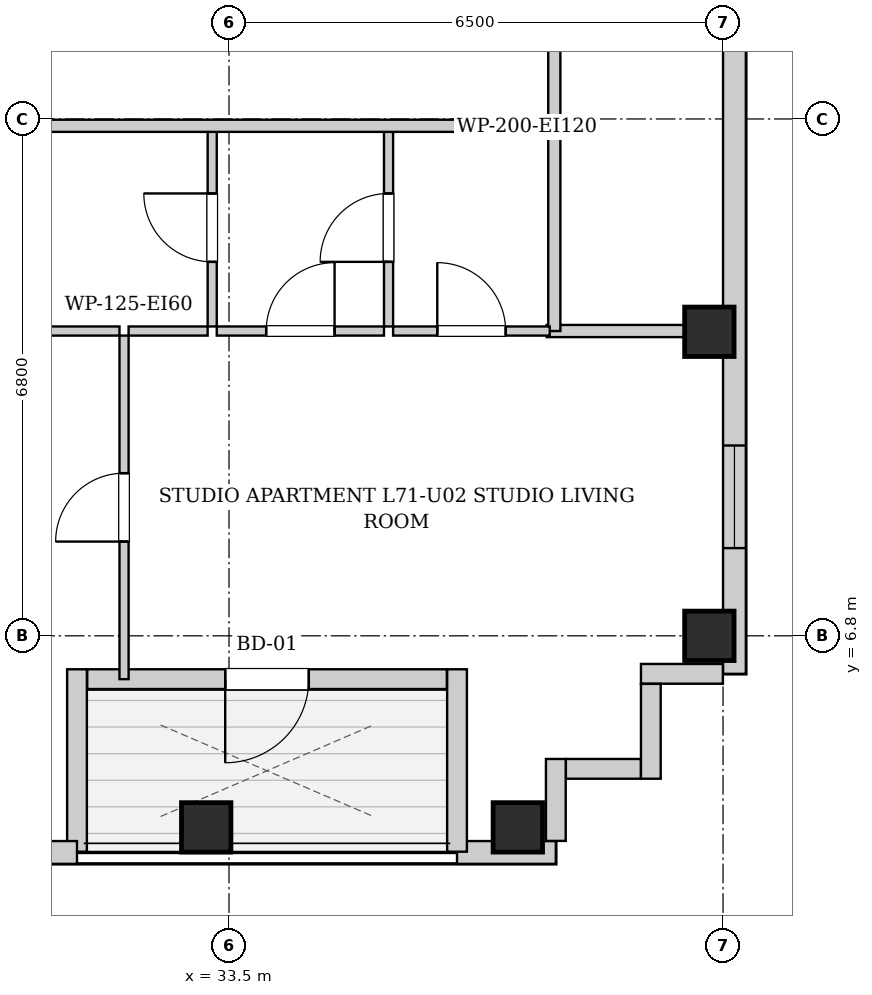
"""IFC4 building model, lengths in metres.
Left out: names, types, materials, properties, quantities, classifications, styles, units other than length and angle.
Written with IfcOpenShell. Run it as: python <this file> out.ifc"""

import sys

from ifc_helpers import new_model, si_unit, direction, frame, frame_2d, origin, origin_2d, place, context, subcontext, project, spatial, rectangle, extrude, element, fill, save


model = new_model("IFC4")
c1 = context("Model", 3, precision=1e-05, world=origin(), true_north=direction((0.0, 1.0)))
c2 = subcontext(c1, "Body", "Model", "MODEL_VIEW")
j1 = project(units=[si_unit("LENGTHUNIT", "METRE"), si_unit("PLANEANGLEUNIT", "RADIAN")], contexts=[c1])
p1 = place(None, origin())
s1 = spatial("IfcSite", under=j1, at=p1, CompositionType="ELEMENT")
p2 = place(p1, origin())
s2 = spatial("IfcBuilding", under=s1, at=p2, CompositionType="ELEMENT")
p3 = place(p2, frame((0.0, 0.0, 244.5)))
s3 = spatial("IfcBuildingStorey", under=s2, at=p3, CompositionType="ELEMENT", Elevation=244.5)
for number, where, z_axis, x_axis in (
    (1, (33.2, 4.28, 0.0), (0.0, 0.0, 1.0), (1.0, 0.0, 0.0)),
    (2, (37.3, 4.28, 0.0), (0.0, 0.0, 1.0), (1.0, 0.0, 0.0)),
    (3, (39.82, 6.8, 0.0), (0.0, 0.0, 1.0), (1.0, 0.0, 0.0)),
    (4, (39.82, 10.8, 0.0), (0.0, 0.0, 1.0), (1.0, 0.0, 0.0)),
):
    element("IfcColumn", number, at=place(p3, frame(where, z_axis=z_axis, x_axis=x_axis)), inside=s3, PredefinedType="COLUMN", context=c2, shape_type="SweptSolid", body=[
        extrude(rectangle(XDim=0.65, YDim=0.65, at=origin_2d()), origin(), (0.0, 0.0, 1.0), 3.4),
    ])
p4 = place(p3, frame((40.15, 37.7, 0.0), z_axis=(0.0, 0.0, 1.0), x_axis=(0.0, -1.0, 0.0)))
e5 = element("IfcWall", 5, at=p4, inside=s3, PredefinedType="SOLIDWALL", context=c2, shape_type="SweptSolid", body=[
    extrude(rectangle(XDim=31.4, YDim=0.3, at=frame_2d((15.7, 0.0))), origin(), (0.0, 0.0, 1.0), 3.14),
])
p5 = place(p4, frame((28.396, 0.0, 0.55)))
e6 = element("IfcOpeningElement", 6, at=p5, cuts=e5, PredefinedType="OPENING", context=c2, shape_type="SweptSolid", body=[
    extrude(rectangle(XDim=1.35, YDim=1.2, at=frame_2d((0.675, 0.6))), frame((0.0, 0.16, 0.0), z_axis=(0.0, -1.0, 0.0), x_axis=(1.0, 0.0, 0.0)), (0.0, 0.0, 1.0), 0.32),
])
p6 = place(p4, frame((1.653, 0.0, 0.55)))
e7 = element("IfcOpeningElement", 7, at=p6, cuts=e5, PredefinedType="OPENING", context=c2, shape_type="SweptSolid", body=[
    extrude(rectangle(XDim=1.35, YDim=1.2, at=frame_2d((0.675, 0.6))), frame((0.0, 0.16, 0.0), z_axis=(0.0, -1.0, 0.0), x_axis=(1.0, 0.0, 0.0)), (0.0, 0.0, 1.0), 0.32),
])
p7 = place(p4, frame((19.683, 0.0, 0.55)))
e8 = element("IfcOpeningElement", 8, at=p7, cuts=e5, PredefinedType="OPENING", context=c2, shape_type="SweptSolid", body=[
    extrude(rectangle(XDim=1.35, YDim=1.2, at=frame_2d((0.675, 0.6))), frame((0.0, 0.16, 0.0), z_axis=(0.0, -1.0, 0.0), x_axis=(1.0, 0.0, 0.0)), (0.0, 0.0, 1.0), 0.32),
])
p8 = place(p4, frame((10.367, 0.0, 0.55)))
e9 = element("IfcOpeningElement", 9, at=p8, cuts=e5, PredefinedType="OPENING", context=c2, shape_type="SweptSolid", body=[
    extrude(rectangle(XDim=1.35, YDim=1.2, at=frame_2d((0.675, 0.6))), frame((0.0, 0.16, 0.0), z_axis=(0.0, -1.0, 0.0), x_axis=(1.0, 0.0, 0.0)), (0.0, 0.0, 1.0), 0.32),
])
p9 = place(p3, frame((37.8, 3.95, 0.0), z_axis=(0.0, 0.0, 1.0), x_axis=(-1.0, 0.0, 0.0)))
e10 = element("IfcWall", 10, at=p9, inside=s3, PredefinedType="SOLIDWALL", context=c2, shape_type="SweptSolid", body=[
    extrude(rectangle(XDim=1.3, YDim=0.3, at=frame_2d((0.65, 0.0))), origin(), (0.0, 0.0, 1.0), 3.14),
])
p10 = place(p3, frame((36.5, 3.96, 0.0), z_axis=(0.0, 0.0, 1.0), x_axis=(0.0, 1.0, 0.0)))
e11 = element("IfcWall", 11, at=p10, inside=s3, PredefinedType="SOLIDWALL", context=c2, shape_type="SweptSolid", body=[
    extrude(rectangle(XDim=2.4, YDim=0.26, at=frame_2d((1.2, 0.0))), origin(), (0.0, 0.0, 1.0), 3.14),
])
p11 = place(p3, frame((36.366, 6.23, 0.0), z_axis=(0.0, 0.0, 1.0), x_axis=(-1.0, 0.0, 0.0)))
e12 = element("IfcWall", 12, at=p11, inside=s3, PredefinedType="SOLIDWALL", context=c2, shape_type="SweptSolid", body=[
    extrude(rectangle(XDim=4.732, YDim=0.26, at=frame_2d((2.366, 0.0))), origin(), (0.0, 0.0, 1.0), 3.14),
])
p12 = place(p11, frame((1.816, 0.0, 0.0)))
e13 = element("IfcOpeningElement", 13, at=p12, cuts=e12, PredefinedType="OPENING", context=c2, shape_type="SweptSolid", body=[
    extrude(rectangle(XDim=1.1, YDim=2.0, at=frame_2d((0.55, 1.0))), frame((0.0, 0.14, 0.0), z_axis=(0.0, -1.0, 0.0), x_axis=(1.0, 0.0, 0.0)), (0.0, 0.0, 1.0), 0.28),
])
p13 = place(p3, frame((31.5, 6.36, 0.0), z_axis=(0.0, 0.0, 1.0), x_axis=(0.0, -1.0, 0.0)))
e14 = element("IfcWall", 14, at=p13, inside=s3, PredefinedType="SOLIDWALL", context=c2, shape_type="SweptSolid", body=[
    extrude(rectangle(XDim=2.4, YDim=0.26, at=frame_2d((1.2, 0.0))), origin(), (0.0, 0.0, 1.0), 3.14),
])
p14 = place(p3, frame((31.5, 3.95, 0.0), z_axis=(0.0, 0.0, 1.0), x_axis=(-1.0, 0.0, 0.0)))
e15 = element("IfcWall", 15, at=p14, inside=s3, PredefinedType="SOLIDWALL", context=c2, shape_type="SweptSolid", body=[
    extrude(rectangle(XDim=10.1, YDim=0.3, at=frame_2d((5.05, 0.0))), origin(), (0.0, 0.0, 1.0), 3.14),
])
p15 = place(p14, frame((3.15, 0.0, 0.55)))
e16 = element("IfcOpeningElement", 16, at=p15, cuts=e15, PredefinedType="OPENING", context=c2, shape_type="SweptSolid", body=[
    extrude(rectangle(XDim=0.85, YDim=1.2, at=frame_2d((0.425, 0.6))), frame((0.0, 0.16, 0.0), z_axis=(0.0, -1.0, 0.0), x_axis=(1.0, 0.0, 0.0)), (0.0, 0.0, 1.0), 0.32),
])
p16 = place(p14, frame((0.757, 0.0, 0.55)))
e17 = element("IfcOpeningElement", 17, at=p16, cuts=e15, PredefinedType="OPENING", context=c2, shape_type="SweptSolid", body=[
    extrude(rectangle(XDim=1.35, YDim=1.2, at=frame_2d((0.675, 0.6))), frame((0.0, 0.16, 0.0), z_axis=(0.0, -1.0, 0.0), x_axis=(1.0, 0.0, 0.0)), (0.0, 0.0, 1.0), 0.32),
])
p17 = place(p3, frame((39.998, 6.3, 0.0), z_axis=(0.0, 0.0, 1.0), x_axis=(-1.0, 0.0, 0.0)))
e18 = element("IfcWall", 18, at=p17, inside=s3, PredefinedType="SOLIDWALL", context=c2, shape_type="SweptSolid", body=[
    extrude(rectangle(XDim=1.078, YDim=0.26, at=frame_2d((0.539, 0.0))), origin(), (0.0, 0.0, 1.0), 3.14),
])
p18 = place(p3, frame((39.05, 6.168, 0.0), z_axis=(0.0, 0.0, 1.0), x_axis=(0.0, -1.0, 0.0)))
e19 = element("IfcWall", 19, at=p18, inside=s3, PredefinedType="SOLIDWALL", context=c2, shape_type="SweptSolid", body=[
    extrude(rectangle(XDim=1.248, YDim=0.26, at=frame_2d((0.624, 0.0))), origin(), (0.0, 0.0, 1.0), 3.14),
])
p19 = place(p3, frame((38.918, 5.05, 0.0), z_axis=(0.0, 0.0, 1.0), x_axis=(-1.0, 0.0, 0.0)))
e20 = element("IfcWall", 20, at=p19, inside=s3, PredefinedType="SOLIDWALL", context=c2, shape_type="SweptSolid", body=[
    extrude(rectangle(XDim=0.986, YDim=0.26, at=frame_2d((0.493, 0.0))), origin(), (0.0, 0.0, 1.0), 3.14),
])
p20 = place(p3, frame((37.8, 5.18, 0.0), z_axis=(0.0, 0.0, 1.0), x_axis=(0.0, -1.0, 0.0)))
e21 = element("IfcWall", 21, at=p20, inside=s3, PredefinedType="SOLIDWALL", context=c2, shape_type="SweptSolid", body=[
    extrude(rectangle(XDim=1.078, YDim=0.26, at=frame_2d((0.539, 0.0))), origin(), (0.0, 0.0, 1.0), 3.14),
])
p21 = place(p3, frame((37.78, 13.51, 0.0), z_axis=(0.0, 0.0, 1.0), x_axis=(0.0, 1.0, 0.0)))
e22 = element("IfcWall", 22, at=p21, inside=s3, PredefinedType="PARTITIONING", context=c2, shape_type="SweptSolid", body=[
    extrude(rectangle(XDim=1.58, YDim=0.16, at=frame_2d((0.79, 0.0))), origin(), (0.0, 0.0, 1.0), 3.14),
])
p22 = place(p3, frame((37.68, 10.81, 0.0), z_axis=(0.0, 0.0, 1.0), x_axis=(1.0, 0.0, 0.0)))
e23 = element("IfcWall", 23, at=p22, inside=s3, PredefinedType="PARTITIONING", context=c2, shape_type="SweptSolid", body=[
    extrude(rectangle(XDim=2.34, YDim=0.16, at=frame_2d((1.17, 0.0))), origin(), (0.0, 0.0, 1.0), 3.14),
])
p23 = place(p3, frame((37.78, 10.81, 0.0), z_axis=(0.0, 0.0, 1.0), x_axis=(0.0, 1.0, 0.0)))
e24 = element("IfcWall", 24, at=p23, inside=s3, PredefinedType="PARTITIONING", context=c2, shape_type="SweptSolid", body=[
    extrude(rectangle(XDim=2.66, YDim=0.16, at=frame_2d((1.33, 0.0))), origin(), (0.0, 0.0, 1.0), 3.14),
])
p24 = place(p3, frame((33.279, 10.87, 0.0), z_axis=(0.0, 0.0, 1.0), x_axis=(0.0, 1.0, 0.0)))
e25 = element("IfcWall", 25, at=p24, inside=s3, PredefinedType="PARTITIONING", context=c2, shape_type="SweptSolid", body=[
    extrude(rectangle(XDim=2.6, YDim=0.12, at=frame_2d((1.3, 0.0))), origin(), (0.0, 0.0, 1.0), 2.668),
])
p25 = place(p24, frame((0.85, 0.0, 0.0)))
e26 = element("IfcOpeningElement", 26, at=p25, cuts=e25, PredefinedType="OPENING", context=c2, shape_type="SweptSolid", body=[
    extrude(rectangle(XDim=0.9, YDim=2.05, at=frame_2d((0.45, 1.025))), frame((0.0, 0.07, 0.0), z_axis=(0.0, -1.0, 0.0), x_axis=(1.0, 0.0, 0.0)), (0.0, 0.0, 1.0), 0.14),
])
for number, where, z_axis, x_axis in (
    (27, (31.019, 10.81, 0.0), (0.0, 0.0, 1.0), (1.0, 0.0, 0.0)),
    (28, (32.179, 10.81, 0.0), (0.0, 0.0, 1.0), (1.0, 0.0, 0.0)),
):
    element("IfcWall", number, at=place(p3, frame(where, z_axis=z_axis, x_axis=x_axis)), inside=s3, PredefinedType="PARTITIONING", context=c2, shape_type="SweptSolid", body=[
        extrude(rectangle(XDim=1.04, YDim=0.12, at=frame_2d((0.52, 0.0))), origin(), (0.0, 0.0, 1.0), 3.14),
    ])
p26 = place(p3, frame((35.599, 10.87, 0.0), z_axis=(0.0, 0.0, 1.0), x_axis=(0.0, 1.0, 0.0)))
e29 = element("IfcWall", 29, at=p26, inside=s3, PredefinedType="PARTITIONING", context=c2, shape_type="SweptSolid", body=[
    extrude(rectangle(XDim=2.6, YDim=0.12, at=frame_2d((1.3, 0.0))), origin(), (0.0, 0.0, 1.0), 3.14),
])
p27 = place(p26, frame((0.85, 0.0, 0.0)))
e30 = element("IfcOpeningElement", 30, at=p27, cuts=e29, PredefinedType="OPENING", context=c2, shape_type="SweptSolid", body=[
    extrude(rectangle(XDim=0.9, YDim=2.05, at=frame_2d((0.45, 1.025))), frame((0.0, 0.07, 0.0), z_axis=(0.0, -1.0, 0.0), x_axis=(1.0, 0.0, 0.0)), (0.0, 0.0, 1.0), 0.14),
])
p28 = place(p3, frame((33.339, 10.81, 0.0), z_axis=(0.0, 0.0, 1.0), x_axis=(1.0, 0.0, 0.0)))
e31 = element("IfcWall", 31, at=p28, inside=s3, PredefinedType="PARTITIONING", context=c2, shape_type="SweptSolid", body=[
    extrude(rectangle(XDim=2.2, YDim=0.12, at=frame_2d((1.1, 0.0))), origin(), (0.0, 0.0, 1.0), 3.14),
])
p29 = place(p28, frame((0.65, 0.0, 0.0)))
e32 = element("IfcOpeningElement", 32, at=p29, cuts=e31, PredefinedType="OPENING", context=c2, shape_type="SweptSolid", body=[
    extrude(rectangle(XDim=0.9, YDim=2.05, at=frame_2d((0.45, 1.025))), frame((0.0, 0.07, 0.0), z_axis=(0.0, -1.0, 0.0), x_axis=(1.0, 0.0, 0.0)), (0.0, 0.0, 1.0), 0.14),
])
p30 = place(p3, frame((35.659, 10.81, 0.0), z_axis=(0.0, 0.0, 1.0), x_axis=(1.0, 0.0, 0.0)))
e33 = element("IfcWall", 33, at=p30, inside=s3, PredefinedType="PARTITIONING", context=c2, shape_type="SweptSolid", body=[
    extrude(rectangle(XDim=2.061, YDim=0.12, at=frame_2d((1.031, 0.0))), origin(), (0.0, 0.0, 1.0), 3.14),
])
p31 = place(p30, frame((0.581, 0.0, 0.0)))
e34 = element("IfcOpeningElement", 34, at=p31, cuts=e33, PredefinedType="OPENING", context=c2, shape_type="SweptSolid", body=[
    extrude(rectangle(XDim=0.9, YDim=2.05, at=frame_2d((0.45, 1.025))), frame((0.0, 0.07, 0.0), z_axis=(0.0, -1.0, 0.0), x_axis=(1.0, 0.0, 0.0)), (0.0, 0.0, 1.0), 0.14),
])
p32 = place(p3, frame((32.119, 6.23, 0.0), z_axis=(0.0, 0.0, 1.0), x_axis=(0.0, 1.0, 0.0)))
e35 = element("IfcWall", 35, at=p32, inside=s3, PredefinedType="PARTITIONING", context=c2, shape_type="SweptSolid", body=[
    extrude(rectangle(XDim=4.52, YDim=0.12, at=frame_2d((2.26, 0.0))), origin(), (0.0, 0.0, 1.0), 3.14),
])
p33 = place(p32, frame((1.81, 0.0, 0.0)))
e36 = element("IfcOpeningElement", 36, at=p33, cuts=e35, PredefinedType="OPENING", context=c2, shape_type="SweptSolid", body=[
    extrude(rectangle(XDim=0.9, YDim=2.05, at=frame_2d((0.45, 1.025))), frame((0.0, 0.07, 0.0), z_axis=(0.0, -1.0, 0.0), x_axis=(1.0, 0.0, 0.0)), (0.0, 0.0, 1.0), 0.14),
])
p34 = place(p3, frame((13.15, 13.51, 0.0), z_axis=(0.0, 0.0, 1.0), x_axis=(1.0, 0.0, 0.0)))
e37 = element("IfcWall", 37, at=p34, inside=s3, PredefinedType="PARTITIONING", context=c2, shape_type="SweptSolid", body=[
    extrude(rectangle(XDim=24.6, YDim=0.16, at=frame_2d((12.3, 0.0))), origin(), (0.0, 0.0, 1.0), 3.14),
])
p35 = place(p34, frame((3.165, 0.0, 0.0)))
e38 = element("IfcOpeningElement", 38, at=p35, cuts=e37, PredefinedType="OPENING", context=c2, shape_type="SweptSolid", body=[
    extrude(rectangle(XDim=0.95, YDim=2.1, at=frame_2d((0.475, 1.05))), frame((0.0, 0.09, 0.0), z_axis=(0.0, -1.0, 0.0), x_axis=(1.0, 0.0, 0.0)), (0.0, 0.0, 1.0), 0.18),
])
p36 = place(p34, frame((10.414, 0.0, 0.0)))
e39 = element("IfcOpeningElement", 39, at=p36, cuts=e37, PredefinedType="OPENING", context=c2, shape_type="SweptSolid", body=[
    extrude(rectangle(XDim=0.95, YDim=2.1, at=frame_2d((0.475, 1.05))), frame((0.0, 0.09, 0.0), z_axis=(0.0, -1.0, 0.0), x_axis=(1.0, 0.0, 0.0)), (0.0, 0.0, 1.0), 0.18),
])
p37 = place(p25, origin())
e40 = element("IfcDoor", 40, at=p37, inside=s3, OperationType="SINGLE_SWING_RIGHT", PredefinedType="DOOR", context=c2, shape_type="SweptSolid", body=[
    extrude(rectangle(XDim=0.9, YDim=2.05, at=frame_2d((0.45, 1.025))), frame((0.0, 0.025, 0.0), z_axis=(0.0, -1.0, 0.0), x_axis=(1.0, 0.0, 0.0)), (0.0, 0.0, 1.0), 0.05),
])
fill(e26, e40)
p38 = place(p27, origin())
e41 = element("IfcDoor", 41, at=p38, inside=s3, OperationType="SINGLE_SWING_LEFT", PredefinedType="DOOR", context=c2, shape_type="SweptSolid", body=[
    extrude(rectangle(XDim=0.9, YDim=2.05, at=frame_2d((0.45, 1.025))), frame((0.0, 0.025, 0.0), z_axis=(0.0, -1.0, 0.0), x_axis=(1.0, 0.0, 0.0)), (0.0, 0.0, 1.0), 0.05),
])
fill(e30, e41)
p39 = place(p29, origin())
e42 = element("IfcDoor", 42, at=p39, inside=s3, OperationType="SINGLE_SWING_RIGHT", PredefinedType="DOOR", context=c2, shape_type="SweptSolid", body=[
    extrude(rectangle(XDim=0.9, YDim=2.05, at=frame_2d((0.45, 1.025))), frame((0.0, 0.025, 0.0), z_axis=(0.0, -1.0, 0.0), x_axis=(1.0, 0.0, 0.0)), (0.0, 0.0, 1.0), 0.05),
])
fill(e32, e42)
p40 = place(p31, origin())
e43 = element("IfcDoor", 43, at=p40, inside=s3, OperationType="SINGLE_SWING_LEFT", PredefinedType="DOOR", context=c2, shape_type="SweptSolid", body=[
    extrude(rectangle(XDim=0.9, YDim=2.05, at=frame_2d((0.45, 1.025))), frame((0.0, 0.025, 0.0), z_axis=(0.0, -1.0, 0.0), x_axis=(1.0, 0.0, 0.0)), (0.0, 0.0, 1.0), 0.05),
])
fill(e34, e43)
p41 = place(p33, origin())
e44 = element("IfcDoor", 44, at=p41, inside=s3, OperationType="SINGLE_SWING_LEFT", PredefinedType="DOOR", context=c2, shape_type="SweptSolid", body=[
    extrude(rectangle(XDim=0.9, YDim=2.05, at=frame_2d((0.45, 1.025))), frame((0.0, 0.025, 0.0), z_axis=(0.0, -1.0, 0.0), x_axis=(1.0, 0.0, 0.0)), (0.0, 0.0, 1.0), 0.05),
])
fill(e36, e44)
p42 = place(p12, origin())
e45 = element("IfcDoor", 45, at=p42, inside=s3, OperationType="SINGLE_SWING_RIGHT", PredefinedType="DOOR", context=c2, shape_type="SweptSolid", body=[
    extrude(rectangle(XDim=1.1, YDim=2.0, at=frame_2d((0.55, 1.0))), frame((0.0, 0.025, 0.0), z_axis=(0.0, -1.0, 0.0), x_axis=(1.0, 0.0, 0.0)), (0.0, 0.0, 1.0), 0.05),
])
fill(e13, e45)
p43 = place(p5, origin())
e46 = element("IfcWindow", 46, at=p43, inside=s3, PartitioningType="SINGLE_PANEL", PredefinedType="WINDOW", context=c2, shape_type="SweptSolid", body=[
    extrude(rectangle(XDim=1.35, YDim=1.2, at=frame_2d((0.675, 0.6))), frame((0.0, 0.03, 0.0), z_axis=(0.0, -1.0, 0.0), x_axis=(1.0, 0.0, 0.0)), (0.0, 0.0, 1.0), 0.06),
])
fill(e6, e46)
save(model, sys.argv[1])
